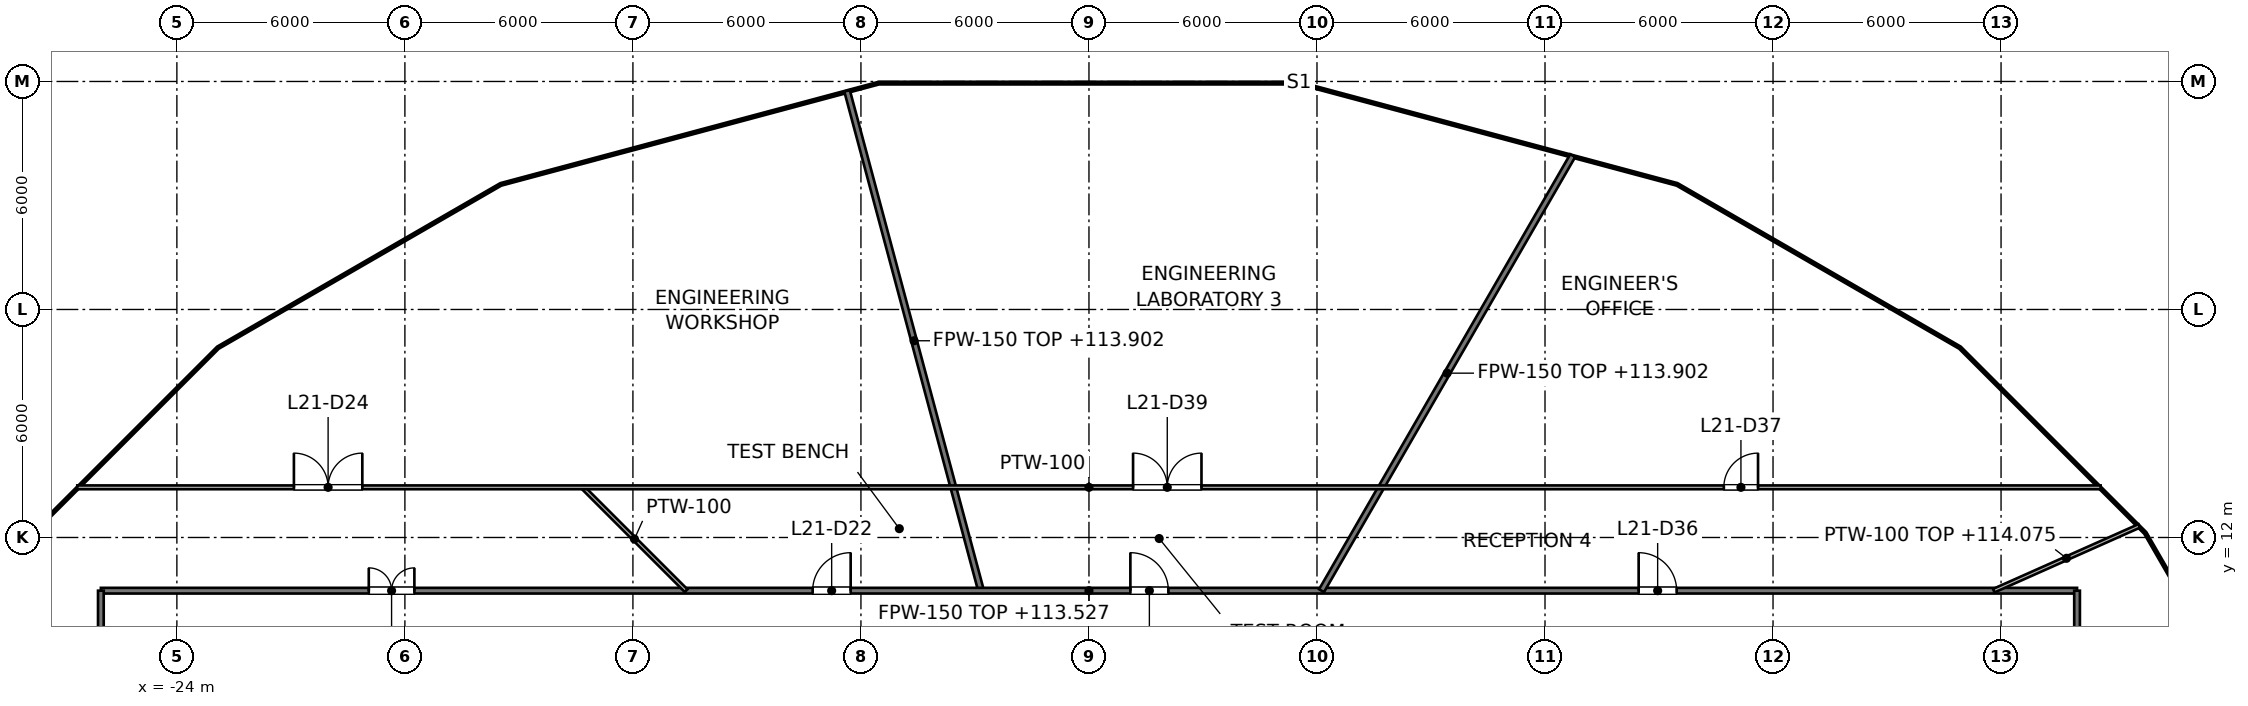
"""IFC4 building model, lengths in metres.
Left out: names, types, materials, properties, quantities, classifications, styles, units other than length and angle.
Written with IfcOpenShell. Run it as: python <this file> out.ifc"""

import sys

from ifc_helpers import new_model, si_unit, direction, frame, frame_2d, origin, place, context, subcontext, project, spatial, rectangle, extrude, element, fill, save


model = new_model("IFC4")
c1 = context("Model", 3, precision=1e-05, world=origin(), true_north=direction((0.0, 1.0)))
c2 = subcontext(c1, "Body", "Model", "MODEL_VIEW")
j1 = project(units=[si_unit("LENGTHUNIT", "METRE"), si_unit("PLANEANGLEUNIT", "RADIAN")], contexts=[c1])
p1 = place(None, origin())
s1 = spatial("IfcSite", under=j1, at=p1, CompositionType="ELEMENT")
p2 = place(p1, origin())
s2 = spatial("IfcBuilding", under=s1, at=p2, CompositionType="ELEMENT")
p3 = place(p2, frame((0.0, 0.0, 110.4)))
s3 = spatial("IfcBuildingStorey", under=s2, at=p3, CompositionType="ELEMENT", Elevation=110.4)
p4 = place(p3, frame((-6.365, 23.754, 0.0), z_axis=(0.0, 0.0, 1.0), x_axis=(0.258859748235, -0.965914918998, 0.0)))
e1 = element("IfcWall", 1, at=p4, inside=s3, PredefinedType="PARTITIONING", context=c2, shape_type="SweptSolid", body=[
    extrude(rectangle(XDim=13.618, YDim=0.15, at=frame_2d((6.809, 0.0))), origin(), (0.0, 0.0, 1.0), 3.502),
])
p5 = place(p3, frame((-26.0, 10.6, 0.0), z_axis=(0.0, 0.0, 1.0), x_axis=(1.0, 0.0, 0.0)))
e2 = element("IfcWall", 2, at=p5, inside=s3, PredefinedType="PARTITIONING", context=c2, shape_type="SweptSolid", body=[
    extrude(rectangle(XDim=52.0, YDim=0.15, at=frame_2d((26.0, 0.0))), origin(), (0.0, 0.0, 1.0), 3.127),
])
p6 = place(p5, frame((18.729, 0.0, 0.0)))
e3 = element("IfcOpeningElement", 3, at=p6, cuts=e2, PredefinedType="OPENING", context=c2, shape_type="SweptSolid", body=[
    extrude(rectangle(XDim=1.0, YDim=2.1, at=frame_2d((0.5, 1.05))), frame((0.0, 0.075, 0.0), z_axis=(0.0, -1.0, 0.0), x_axis=(1.0, 0.0, 0.0)), (0.0, 0.0, 1.0), 0.15),
])
p7 = place(p5, frame((7.05, 0.0, 0.0)))
e4 = element("IfcOpeningElement", 4, at=p7, cuts=e2, PredefinedType="OPENING", context=c2, shape_type="SweptSolid", body=[
    extrude(rectangle(XDim=1.2, YDim=2.1, at=frame_2d((0.6, 1.05))), frame((0.0, 0.075, 0.0), z_axis=(0.0, -1.0, 0.0), x_axis=(1.0, 0.0, 0.0)), (0.0, 0.0, 1.0), 0.15),
])
p8 = place(p5, frame((40.464, 0.0, 0.0)))
e5 = element("IfcOpeningElement", 5, at=p8, cuts=e2, PredefinedType="OPENING", context=c2, shape_type="SweptSolid", body=[
    extrude(rectangle(XDim=1.0, YDim=2.1, at=frame_2d((0.5, 1.05))), frame((0.0, 0.075, 0.0), z_axis=(0.0, -1.0, 0.0), x_axis=(1.0, 0.0, 0.0)), (0.0, 0.0, 1.0), 0.15),
])
p9 = place(p5, frame((27.09, 0.0, 0.0)))
e6 = element("IfcOpeningElement", 6, at=p9, cuts=e2, PredefinedType="OPENING", context=c2, shape_type="SweptSolid", body=[
    extrude(rectangle(XDim=1.0, YDim=2.1, at=frame_2d((0.5, 1.05))), frame((0.0, 0.075, 0.0), z_axis=(0.0, -1.0, 0.0), x_axis=(1.0, 0.0, 0.0)), (0.0, 0.0, 1.0), 0.15),
])
p10 = place(p3, frame((6.12, 10.6, 0.0), z_axis=(0.0, 0.0, 1.0), x_axis=(0.499951080785, 0.866053645464, 0.0)))
e7 = element("IfcWall", 7, at=p10, inside=s3, PredefinedType="PARTITIONING", context=c2, shape_type="SweptSolid", body=[
    extrude(rectangle(XDim=13.219, YDim=0.15, at=frame_2d((6.609, 0.0))), origin(), (0.0, 0.0, 1.0), 3.502),
])
for number, where, z_axis, x_axis in (
    (8, (26.0, 7.8, 0.0), (0.0, 0.0, 1.0), (0.0, 1.0, 0.0)),
    (9, (-26.0, 7.8, 0.0), (0.0, 0.0, 1.0), (0.0, 1.0, 0.0)),
):
    element("IfcWall", number, at=place(p3, frame(where, z_axis=z_axis, x_axis=x_axis)), inside=s3, PredefinedType="PARTITIONING", context=c2, shape_type="SweptSolid", body=[
        extrude(rectangle(XDim=2.8, YDim=0.15, at=frame_2d((1.4, 0.0))), origin(), (0.0, 0.0, 1.0), 3.195),
    ])
p11 = place(p3, frame((-13.32, 13.32, 0.0), z_axis=(0.0, 0.0, 1.0), x_axis=(0.707106781187, -0.707106781187, 0.0)))
e10 = element("IfcWall", 10, at=p11, inside=s3, PredefinedType="PARTITIONING", context=c2, shape_type="SweptSolid", body=[
    extrude(rectangle(XDim=3.847, YDim=0.1, at=frame_2d((1.923, 0.0))), origin(), (0.0, 0.0, 1.0), 3.127),
])
p12 = place(p3, frame((-26.621, 13.32, 0.0), z_axis=(0.0, 0.0, 1.0), x_axis=(1.0, 0.0, 0.0)))
e11 = element("IfcWall", 11, at=p12, inside=s3, PredefinedType="PARTITIONING", context=c2, shape_type="SweptSolid", body=[
    extrude(rectangle(XDim=53.242, YDim=0.1, at=frame_2d((26.621, 0.0))), origin(), (0.0, 0.0, 1.0), 3.127),
])
p13 = place(p12, frame((5.7, 0.0, 0.0)))
e12 = element("IfcOpeningElement", 12, at=p13, cuts=e11, PredefinedType="OPENING", context=c2, shape_type="SweptSolid", body=[
    extrude(rectangle(XDim=1.8, YDim=2.1, at=frame_2d((0.9, 1.05))), frame((0.0, 0.05, 0.0), z_axis=(0.0, -1.0, 0.0), x_axis=(1.0, 0.0, 0.0)), (0.0, 0.0, 1.0), 0.1),
])
p14 = place(p12, frame((43.326, 0.0, 0.0)))
e13 = element("IfcOpeningElement", 13, at=p14, cuts=e11, PredefinedType="OPENING", context=c2, shape_type="SweptSolid", body=[
    extrude(rectangle(XDim=0.9, YDim=2.1, at=frame_2d((0.45, 1.05))), frame((0.0, 0.05, 0.0), z_axis=(0.0, -1.0, 0.0), x_axis=(1.0, 0.0, 0.0)), (0.0, 0.0, 1.0), 0.1),
])
p15 = place(p12, frame((27.781, 0.0, 0.0)))
e14 = element("IfcOpeningElement", 14, at=p15, cuts=e11, PredefinedType="OPENING", context=c2, shape_type="SweptSolid", body=[
    extrude(rectangle(XDim=1.8, YDim=2.1, at=frame_2d((0.9, 1.05))), frame((0.0, 0.05, 0.0), z_axis=(0.0, -1.0, 0.0), x_axis=(1.0, 0.0, 0.0)), (0.0, 0.0, 1.0), 0.1),
])
p16 = place(p3, frame((23.808, 10.6, 0.0), z_axis=(0.0, 0.0, 1.0), x_axis=(0.913496537011, 0.406846502835, 0.0)))
e15 = element("IfcWall", 15, at=p16, inside=s3, PredefinedType="PARTITIONING", context=c2, shape_type="SweptSolid", body=[
    extrude(rectangle(XDim=4.19, YDim=0.1, at=frame_2d((2.095, 0.0))), origin(), (0.0, 0.0, 1.0), 3.675),
])
p17 = place(p6, origin())
e16 = element("IfcDoor", 16, at=p17, inside=s3, OperationType="SINGLE_SWING_RIGHT", PredefinedType="DOOR", context=c2, shape_type="SweptSolid", body=[
    extrude(rectangle(XDim=1.0, YDim=2.1, at=frame_2d((0.5, 1.05))), frame((0.0, 0.025, 0.0), z_axis=(0.0, -1.0, 0.0), x_axis=(1.0, 0.0, 0.0)), (0.0, 0.0, 1.0), 0.05),
])
fill(e3, e16)
p18 = place(p7, origin())
e17 = element("IfcDoor", 17, at=p18, inside=s3, OperationType="DOUBLE_DOOR_SINGLE_SWING", PredefinedType="DOOR", context=c2, shape_type="SweptSolid", body=[
    extrude(rectangle(XDim=1.2, YDim=2.1, at=frame_2d((0.6, 1.05))), frame((0.0, 0.025, 0.0), z_axis=(0.0, -1.0, 0.0), x_axis=(1.0, 0.0, 0.0)), (0.0, 0.0, 1.0), 0.05),
])
fill(e4, e17)
p19 = place(p13, origin())
e18 = element("IfcDoor", 18, at=p19, inside=s3, OperationType="DOUBLE_DOOR_SINGLE_SWING", PredefinedType="DOOR", context=c2, shape_type="SweptSolid", body=[
    extrude(rectangle(XDim=1.8, YDim=2.1, at=frame_2d((0.9, 1.05))), frame((0.0, 0.025, 0.0), z_axis=(0.0, -1.0, 0.0), x_axis=(1.0, 0.0, 0.0)), (0.0, 0.0, 1.0), 0.05),
])
fill(e12, e18)
p20 = place(p8, origin())
e19 = element("IfcDoor", 19, at=p20, inside=s3, OperationType="SINGLE_SWING_LEFT", PredefinedType="DOOR", context=c2, shape_type="SweptSolid", body=[
    extrude(rectangle(XDim=1.0, YDim=2.1, at=frame_2d((0.5, 1.05))), frame((0.0, 0.025, 0.0), z_axis=(0.0, -1.0, 0.0), x_axis=(1.0, 0.0, 0.0)), (0.0, 0.0, 1.0), 0.05),
])
fill(e5, e19)
p21 = place(p14, origin())
e20 = element("IfcDoor", 20, at=p21, inside=s3, OperationType="SINGLE_SWING_RIGHT", PredefinedType="DOOR", context=c2, shape_type="SweptSolid", body=[
    extrude(rectangle(XDim=0.9, YDim=2.1, at=frame_2d((0.45, 1.05))), frame((0.0, 0.025, 0.0), z_axis=(0.0, -1.0, 0.0), x_axis=(1.0, 0.0, 0.0)), (0.0, 0.0, 1.0), 0.05),
])
fill(e13, e20)
p22 = place(p9, origin())
e21 = element("IfcDoor", 21, at=p22, inside=s3, OperationType="SINGLE_SWING_LEFT", PredefinedType="DOOR", context=c2, shape_type="SweptSolid", body=[
    extrude(rectangle(XDim=1.0, YDim=2.1, at=frame_2d((0.5, 1.05))), frame((0.0, 0.025, 0.0), z_axis=(0.0, -1.0, 0.0), x_axis=(1.0, 0.0, 0.0)), (0.0, 0.0, 1.0), 0.05),
])
fill(e6, e21)
p23 = place(p15, origin())
e22 = element("IfcDoor", 22, at=p23, inside=s3, OperationType="DOUBLE_DOOR_SINGLE_SWING", PredefinedType="DOOR", context=c2, shape_type="SweptSolid", body=[
    extrude(rectangle(XDim=1.8, YDim=2.1, at=frame_2d((0.9, 1.05))), frame((0.0, 0.025, 0.0), z_axis=(0.0, -1.0, 0.0), x_axis=(1.0, 0.0, 0.0)), (0.0, 0.0, 1.0), 0.05),
])
fill(e14, e22)
save(model, sys.argv[1])
